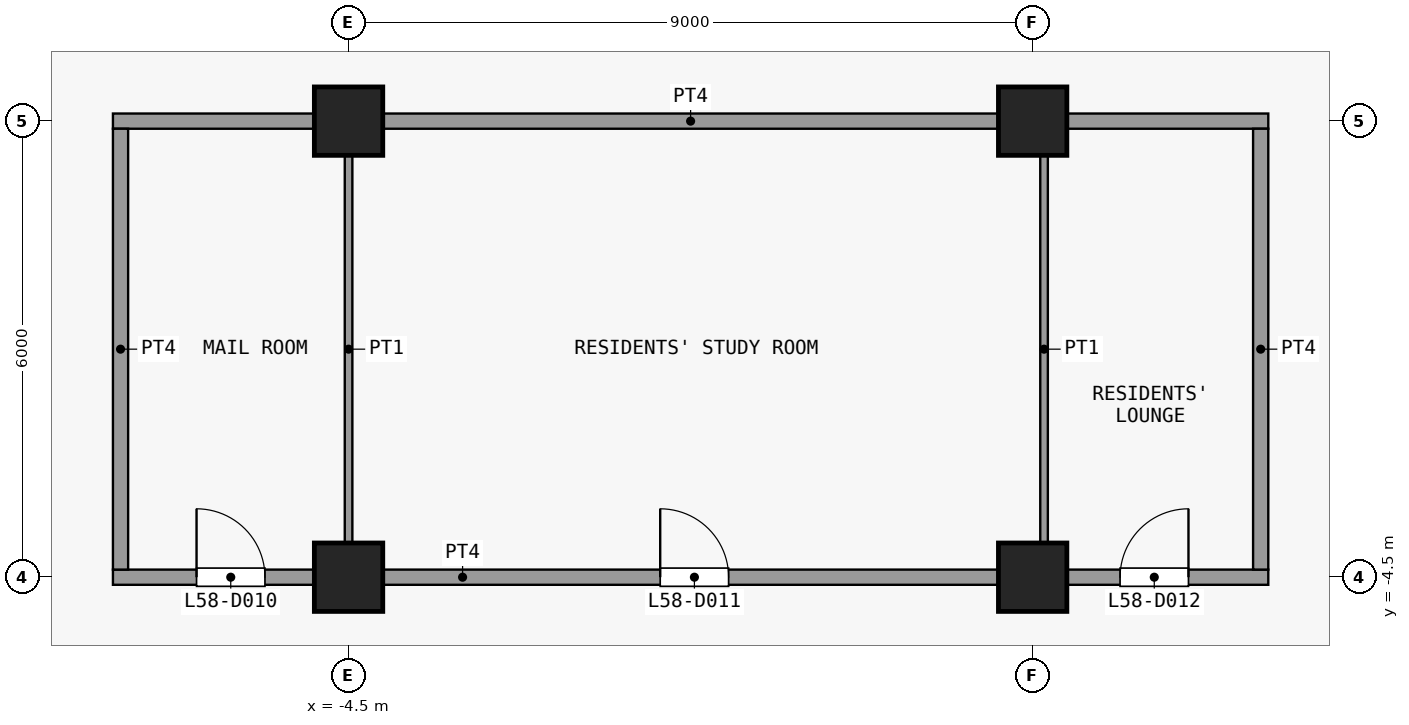
"""IFC4 building model, lengths in metres.
Left out: names, types, materials, properties, quantities, classifications, styles, units other than length and angle.
Written with IfcOpenShell. Run it as: python <this file> out.ifc"""

import sys

from ifc_helpers import new_model, si_unit, direction, frame, frame_2d, origin, origin_2d, place, context, subcontext, project, spatial, rectangle, extrude, element, fill, save


model = new_model("IFC4")
c1 = context("Model", 3, precision=1e-05, world=origin(), true_north=direction((0.0, 1.0)))
c2 = subcontext(c1, "Body", "Model", "MODEL_VIEW")
j1 = project(units=[si_unit("LENGTHUNIT", "METRE"), si_unit("PLANEANGLEUNIT", "RADIAN")], contexts=[c1])
p1 = place(None, origin())
s1 = spatial("IfcSite", under=j1, at=p1, CompositionType="ELEMENT")
p2 = place(p1, origin())
s2 = spatial("IfcBuilding", under=s1, at=p2, CompositionType="ELEMENT")
p3 = place(p2, frame((0.0, 0.0, 230.3)))
s3 = spatial("IfcBuildingStorey", under=s2, at=p3, CompositionType="ELEMENT", Elevation=230.3)
for number, where, z_axis, x_axis in (
    (1, (-4.5, -4.5, 0.0), (0.0, 0.0, 1.0), (1.0, 0.0, 0.0)),
    (2, (-4.5, 1.5, 0.0), (0.0, 0.0, 1.0), (1.0, 0.0, 0.0)),
    (3, (4.5, -4.5, 0.0), (0.0, 0.0, 1.0), (1.0, 0.0, 0.0)),
    (4, (4.5, 1.5, 0.0), (0.0, 0.0, 1.0), (1.0, 0.0, 0.0)),
):
    element("IfcColumn", number, at=place(p3, frame(where, z_axis=z_axis, x_axis=x_axis)), inside=s3, PredefinedType="COLUMN", context=c2, shape_type="SweptSolid", body=[
        extrude(rectangle(XDim=0.9, YDim=0.9, at=origin_2d()), origin(), (0.0, 0.0, 1.0), 3.6),
    ])
p4 = place(p3, frame((-7.6, -4.5, 0.0), z_axis=(0.0, 0.0, 1.0), x_axis=(1.0, 0.0, 0.0)))
e5 = element("IfcWall", 5, at=p4, inside=s3, PredefinedType="PARTITIONING", context=c2, shape_type="SweptSolid", body=[
    extrude(rectangle(XDim=15.2, YDim=0.2, at=frame_2d((7.6, 0.0))), origin(), (0.0, 0.0, 1.0), 3.3),
])
p5 = place(p4, frame((1.1, 0.0, 0.0)))
e6 = element("IfcOpeningElement", 6, at=p5, cuts=e5, PredefinedType="OPENING", context=c2, shape_type="SweptSolid", body=[
    extrude(rectangle(XDim=0.9, YDim=2.1, at=frame_2d((0.45, 1.05))), frame((0.0, 0.11, 0.0), z_axis=(0.0, -1.0, 0.0), x_axis=(1.0, 0.0, 0.0)), (0.0, 0.0, 1.0), 0.22),
])
p6 = place(p4, frame((7.2, 0.0, 0.0)))
e7 = element("IfcOpeningElement", 7, at=p6, cuts=e5, PredefinedType="OPENING", context=c2, shape_type="SweptSolid", body=[
    extrude(rectangle(XDim=0.9, YDim=2.1, at=frame_2d((0.45, 1.05))), frame((0.0, 0.11, 0.0), z_axis=(0.0, -1.0, 0.0), x_axis=(1.0, 0.0, 0.0)), (0.0, 0.0, 1.0), 0.22),
])
p7 = place(p4, frame((13.25, 0.0, 0.0)))
e8 = element("IfcOpeningElement", 8, at=p7, cuts=e5, PredefinedType="OPENING", context=c2, shape_type="SweptSolid", body=[
    extrude(rectangle(XDim=0.9, YDim=2.1, at=frame_2d((0.45, 1.05))), frame((0.0, 0.11, 0.0), z_axis=(0.0, -1.0, 0.0), x_axis=(1.0, 0.0, 0.0)), (0.0, 0.0, 1.0), 0.22),
])
p8 = place(p3, frame((-7.6, 1.5, 0.0), z_axis=(0.0, 0.0, 1.0), x_axis=(1.0, 0.0, 0.0)))
e9 = element("IfcWall", 9, at=p8, inside=s3, PredefinedType="PARTITIONING", context=c2, shape_type="SweptSolid", body=[
    extrude(rectangle(XDim=15.2, YDim=0.2, at=frame_2d((7.6, 0.0))), origin(), (0.0, 0.0, 1.0), 3.3),
])
p9 = place(p3, frame((-7.5, -4.4, 0.0), z_axis=(0.0, 0.0, 1.0), x_axis=(0.0, 1.0, 0.0)))
e10 = element("IfcWall", 10, at=p9, inside=s3, PredefinedType="PARTITIONING", context=c2, shape_type="SweptSolid", body=[
    extrude(rectangle(XDim=5.8, YDim=0.2, at=frame_2d((2.9, 0.0))), origin(), (0.0, 0.0, 1.0), 3.3),
])
for number, where, z_axis, x_axis in (
    (11, (-4.5, -4.4, 0.0), (0.0, 0.0, 1.0), (0.0, 1.0, 0.0)),
    (12, (4.65, -4.4, 0.0), (0.0, 0.0, 1.0), (0.0, 1.0, 0.0)),
):
    element("IfcWall", number, at=place(p3, frame(where, z_axis=z_axis, x_axis=x_axis)), inside=s3, PredefinedType="PARTITIONING", context=c2, shape_type="SweptSolid", body=[
        extrude(rectangle(XDim=5.8, YDim=0.1, at=frame_2d((2.9, 0.0))), origin(), (0.0, 0.0, 1.0), 3.3),
    ])
p10 = place(p3, frame((7.5, -4.4, 0.0), z_axis=(0.0, 0.0, 1.0), x_axis=(0.0, 1.0, 0.0)))
e13 = element("IfcWall", 13, at=p10, inside=s3, PredefinedType="PARTITIONING", context=c2, shape_type="SweptSolid", body=[
    extrude(rectangle(XDim=5.8, YDim=0.2, at=frame_2d((2.9, 0.0))), origin(), (0.0, 0.0, 1.0), 3.3),
])
p11 = place(p5, origin())
e14 = element("IfcDoor", 14, at=p11, inside=s3, OperationType="SINGLE_SWING_RIGHT", PredefinedType="DOOR", context=c2, shape_type="SweptSolid", body=[
    extrude(rectangle(XDim=0.9, YDim=2.1, at=frame_2d((0.45, 1.05))), frame((0.0, 0.025, 0.0), z_axis=(0.0, -1.0, 0.0), x_axis=(1.0, 0.0, 0.0)), (0.0, 0.0, 1.0), 0.05),
])
fill(e6, e14)
p12 = place(p6, origin())
e15 = element("IfcDoor", 15, at=p12, inside=s3, OperationType="SINGLE_SWING_RIGHT", PredefinedType="DOOR", context=c2, shape_type="SweptSolid", body=[
    extrude(rectangle(XDim=0.9, YDim=2.1, at=frame_2d((0.45, 1.05))), frame((0.0, 0.025, 0.0), z_axis=(0.0, -1.0, 0.0), x_axis=(1.0, 0.0, 0.0)), (0.0, 0.0, 1.0), 0.05),
])
fill(e7, e15)
p13 = place(p7, origin())
e16 = element("IfcDoor", 16, at=p13, inside=s3, OperationType="SINGLE_SWING_LEFT", PredefinedType="DOOR", context=c2, shape_type="SweptSolid", body=[
    extrude(rectangle(XDim=0.9, YDim=2.1, at=frame_2d((0.45, 1.05))), frame((0.0, 0.025, 0.0), z_axis=(0.0, -1.0, 0.0), x_axis=(1.0, 0.0, 0.0)), (0.0, 0.0, 1.0), 0.05),
])
fill(e8, e16)
save(model, sys.argv[1])
